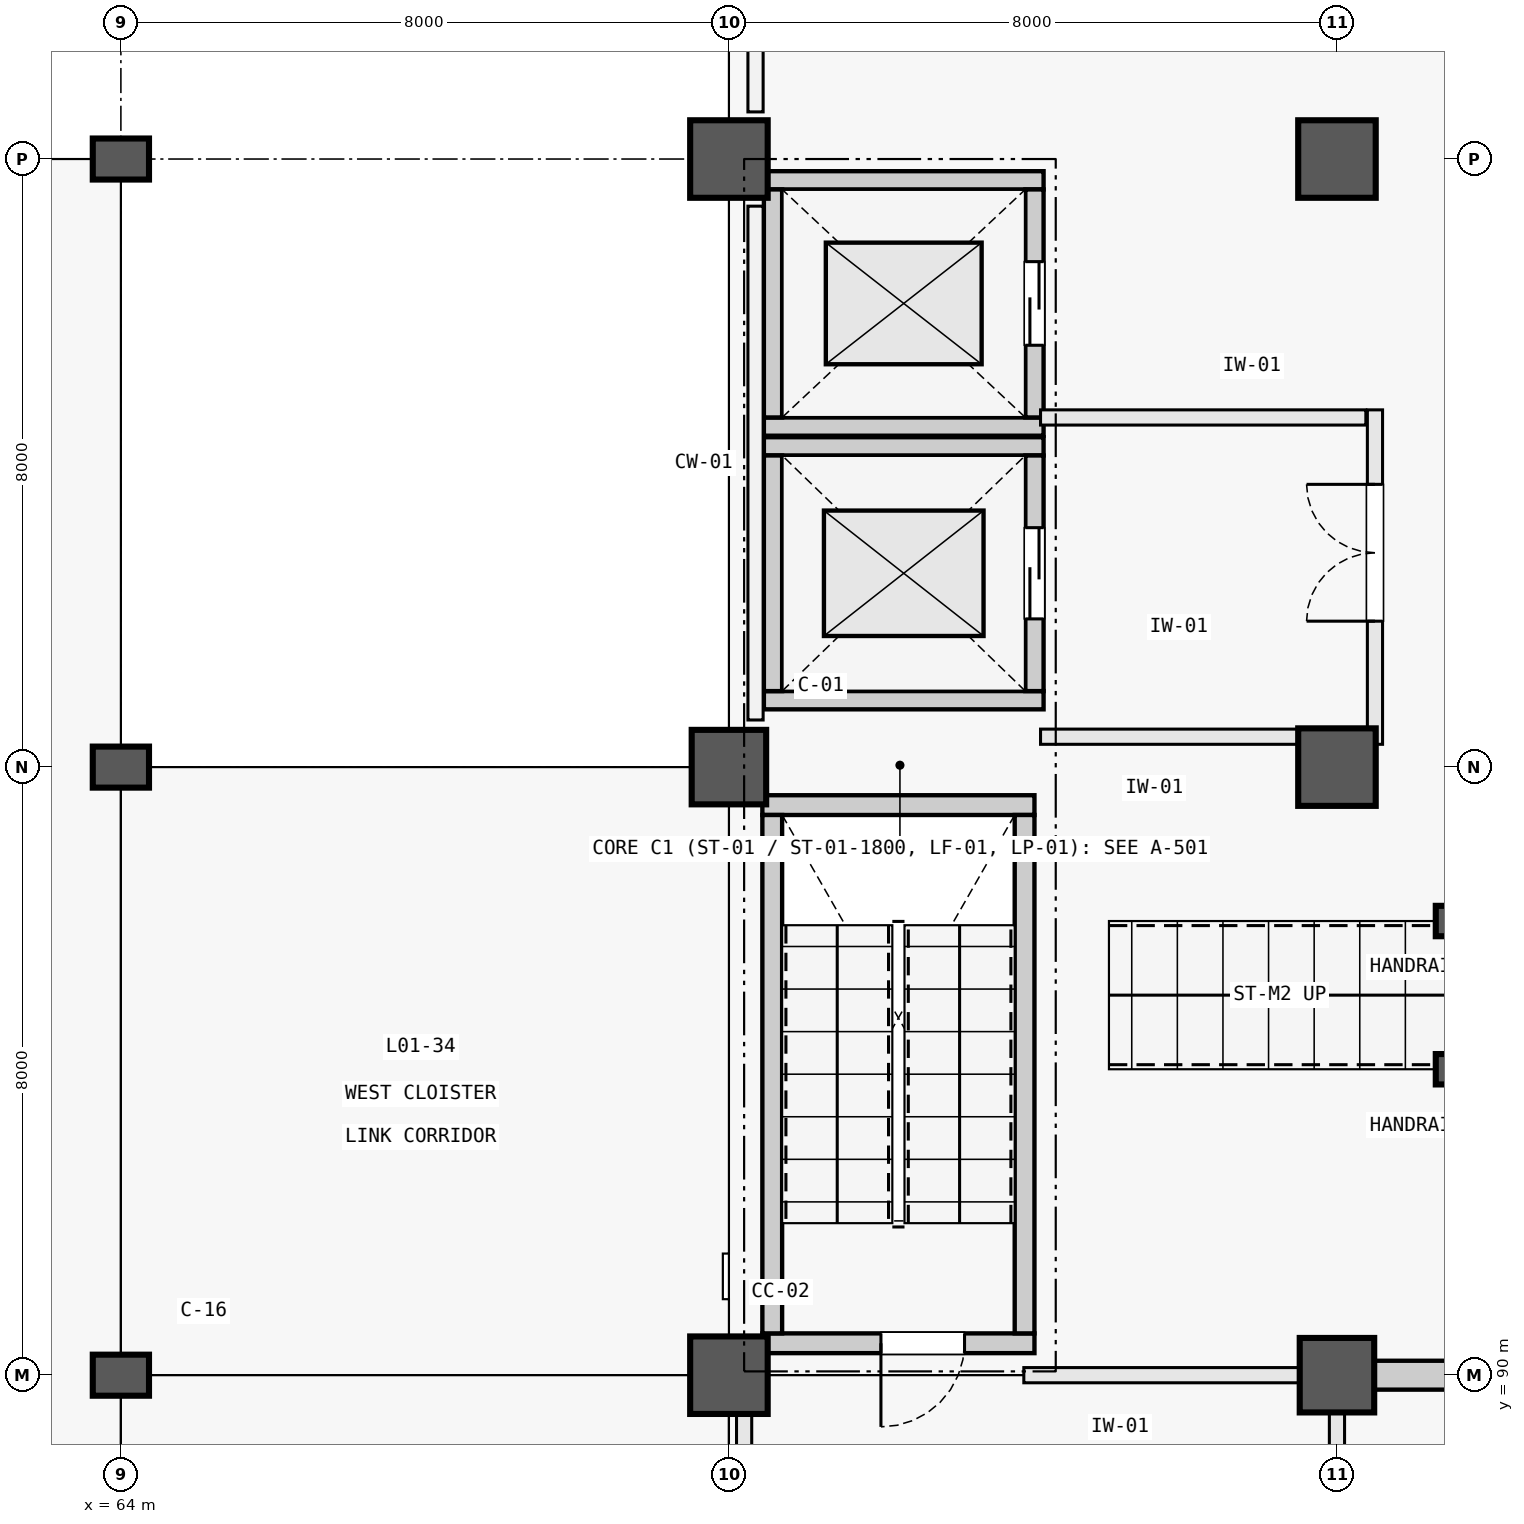
"""IFC4 building model, lengths in metres.
Left out: names, types, materials, properties, quantities, classifications, styles, units other than length and angle.
Written with IfcOpenShell. Run it as: python <this file> out.ifc"""

import sys

from ifc_helpers import new_model, si_unit, direction, frame, frame_2d, origin, origin_2d, place, context, subcontext, project, spatial, rectangle, circle, extrude, element, fill, save


model = new_model("IFC4")
c1 = context("Model", 3, precision=1e-05, world=origin(), true_north=direction((0.0, 1.0)))
c2 = subcontext(c1, "Body", "Model", "MODEL_VIEW")
j1 = project(units=[si_unit("LENGTHUNIT", "METRE"), si_unit("PLANEANGLEUNIT", "RADIAN")], contexts=[c1])
p1 = place(None, origin())
s1 = spatial("IfcSite", under=j1, at=p1, CompositionType="ELEMENT")
p2 = place(p1, origin())
s2 = spatial("IfcBuilding", under=s1, at=p2, CompositionType="ELEMENT")
p3 = place(p2, origin())
s3 = spatial("IfcBuildingStorey", under=s2, at=p3, CompositionType="ELEMENT", Elevation=0.0)
for number, where, z_axis, x_axis in (
    (1, (64.0, 90.0, 0.0), (0.0, 0.0, 1.0), (1.0, 0.0, 0.0)),
    (2, (64.0, 98.0, 0.0), (0.0, 0.0, 1.0), (1.0, 0.0, 0.0)),
    (3, (64.0, 106.0, 0.0), (0.0, 0.0, 1.0), (1.0, 0.0, 0.0)),
):
    element("IfcColumn", number, at=place(p3, frame(where, z_axis=z_axis, x_axis=x_axis)), inside=s3, PredefinedType="COLUMN", context=c2, shape_type="SweptSolid", body=[
        extrude(rectangle(XDim=0.74, YDim=0.54, at=origin_2d()), origin(), (0.0, 0.0, 1.0), 5.4),
    ])
p4 = place(p3, frame((72.0, 90.0, 0.0), z_axis=(0.0, 0.0, 1.0), x_axis=(1.0, 0.0, 0.0)))
e4 = element("IfcColumn", 4, at=p4, inside=s3, PredefinedType="COLUMN", context=c2, shape_type="SweptSolid", body=[
    extrude(circle(Radius=0.51, at=origin_2d()), origin(), (0.0, 0.0, 1.0), 5.4),
])
p5 = place(p3, frame((72.0, 98.0, 0.0), z_axis=(0.0, 0.0, 1.0), x_axis=(1.0, 0.0, 0.0)))
e5 = element("IfcColumn", 5, at=p5, inside=s3, PredefinedType="COLUMN", context=c2, shape_type="SweptSolid", body=[
    extrude(rectangle(XDim=0.98, YDim=0.98, at=origin_2d()), origin(), (0.0, 0.0, 1.0), 5.4),
])
p6 = place(p3, frame((72.0, 106.0, 0.0), z_axis=(0.0, 0.0, 1.0), x_axis=(1.0, 0.0, 0.0)))
e6 = element("IfcColumn", 6, at=p6, inside=s3, PredefinedType="COLUMN", context=c2, shape_type="SweptSolid", body=[
    extrude(circle(Radius=0.51, at=origin_2d()), origin(), (0.0, 0.0, 1.0), 5.4),
])
p7 = place(p3, frame((80.0, 90.0, 0.0), z_axis=(0.0, 0.0, 1.0), x_axis=(1.0, 0.0, 0.0)))
e7 = element("IfcColumn", 7, at=p7, inside=s3, PredefinedType="COLUMN", context=c2, shape_type="SweptSolid", body=[
    extrude(rectangle(XDim=0.98, YDim=0.98, at=origin_2d()), origin(), (0.0, 0.0, 1.0), 5.4),
])
for number, where, z_axis, x_axis in (
    (8, (80.0, 98.0, 0.0), (0.0, 0.0, 1.0), (1.0, 0.0, 0.0)),
    (9, (80.0, 106.0, 0.0), (0.0, 0.0, 1.0), (1.0, 0.0, 0.0)),
):
    element("IfcColumn", number, at=place(p3, frame(where, z_axis=z_axis, x_axis=x_axis)), inside=s3, PredefinedType="COLUMN", context=c2, shape_type="SweptSolid", body=[
        extrude(circle(Radius=0.51, at=origin_2d()), origin(), (0.0, 0.0, 1.0), 5.4),
    ])
p8 = place(p3, frame((80.49, 90.0, 0.0), z_axis=(0.0, 0.0, 1.0), x_axis=(1.0, 0.0, 0.0)))
e10 = element("IfcWall", 10, at=p8, inside=s3, PredefinedType="SHEAR", context=c2, shape_type="SweptSolid", body=[
    extrude(rectangle(XDim=7.0, YDim=0.38, at=frame_2d((3.5, 0.0))), origin(), (0.0, 0.0, 1.0), 5.03),
])
p9 = place(p3, frame((72.44, 90.42, 0.0), z_axis=(0.0, 0.0, 1.0), x_axis=(1.0, 0.0, 0.0)))
e11 = element("IfcWall", 11, at=p9, inside=s3, PredefinedType="SOLIDWALL", context=c2, shape_type="SweptSolid", body=[
    extrude(rectangle(XDim=3.58, YDim=0.26, at=frame_2d((1.79, 0.0))), origin(), (0.0, 0.0, 1.0), 5.4),
])
p10 = place(p9, frame((1.56, 0.0, 0.0)))
e12 = element("IfcOpeningElement", 12, at=p10, cuts=e11, PredefinedType="OPENING", context=c2, shape_type="SweptSolid", body=[
    extrude(rectangle(XDim=1.1, YDim=2.2, at=frame_2d((0.55, 1.1))), frame((0.0, 0.142, 0.0), z_axis=(0.0, -1.0, 0.0), x_axis=(1.0, 0.0, 0.0)), (0.0, 0.0, 1.0), 0.284),
])
p11 = place(p3, frame((72.44, 97.5, 0.0), z_axis=(0.0, 0.0, 1.0), x_axis=(1.0, 0.0, 0.0)))
e13 = element("IfcWall", 13, at=p11, inside=s3, PredefinedType="SOLIDWALL", context=c2, shape_type="SweptSolid", body=[
    extrude(rectangle(XDim=3.58, YDim=0.26, at=frame_2d((1.79, 0.0))), origin(), (0.0, 0.0, 1.0), 5.4),
])
for number, where, z_axis, x_axis in (
    (14, (72.57, 90.55, 0.0), (0.0, 0.0, 1.0), (0.0, 1.0, 0.0)),
    (15, (75.89, 90.55, 0.0), (0.0, 0.0, 1.0), (0.0, 1.0, 0.0)),
):
    element("IfcWall", number, at=place(p3, frame(where, z_axis=z_axis, x_axis=x_axis)), inside=s3, PredefinedType="SOLIDWALL", context=c2, shape_type="SweptSolid", body=[
        extrude(rectangle(XDim=6.82, YDim=0.26, at=frame_2d((3.41, 0.0))), origin(), (0.0, 0.0, 1.0), 5.4),
    ])
for number, where, z_axis, x_axis in (
    (16, (81.5, 94.025, 0.0), (0.0, 0.0, 1.0), (1.0, 0.0, 0.0)),
    (17, (81.5, 95.975, 0.0), (0.0, 0.0, 1.0), (1.0, 0.0, 0.0)),
):
    element("IfcColumn", number, at=place(p3, frame(where, z_axis=z_axis, x_axis=x_axis)), inside=s3, PredefinedType="COLUMN", context=c2, shape_type="SweptSolid", body=[
        extrude(rectangle(XDim=0.4, YDim=0.4, at=origin_2d()), origin(), (0.0, 0.0, 1.0), 2.46),
    ])
for number, where, z_axis, x_axis in (
    (18, (72.46, 98.88, 0.0), (0.0, 0.0, 1.0), (1.0, 0.0, 0.0)),
    (19, (72.46, 102.22, 0.0), (0.0, 0.0, 1.0), (1.0, 0.0, 0.0)),
):
    element("IfcWall", number, at=place(p3, frame(where, z_axis=z_axis, x_axis=x_axis)), inside=s3, PredefinedType="SOLIDWALL", context=c2, shape_type="SweptSolid", body=[
        extrude(rectangle(XDim=3.68, YDim=0.24, at=frame_2d((1.84, 0.0))), origin(), (0.0, 0.0, 1.0), 5.4),
    ])
p12 = place(p3, frame((72.58, 99.0, 0.0), z_axis=(0.0, 0.0, 1.0), x_axis=(0.0, 1.0, 0.0)))
e20 = element("IfcWall", 20, at=p12, inside=s3, PredefinedType="SOLIDWALL", context=c2, shape_type="SweptSolid", body=[
    extrude(rectangle(XDim=3.1, YDim=0.24, at=frame_2d((1.55, 0.0))), origin(), (0.0, 0.0, 1.0), 5.4),
])
p13 = place(p3, frame((76.02, 99.0, 0.0), z_axis=(0.0, 0.0, 1.0), x_axis=(0.0, 1.0, 0.0)))
e21 = element("IfcWall", 21, at=p13, inside=s3, PredefinedType="SOLIDWALL", context=c2, shape_type="SweptSolid", body=[
    extrude(rectangle(XDim=3.1, YDim=0.24, at=frame_2d((1.55, 0.0))), origin(), (0.0, 0.0, 1.0), 5.4),
])
p14 = place(p13, frame((0.95, 0.0, 0.0)))
e22 = element("IfcOpeningElement", 22, at=p14, cuts=e21, PredefinedType="OPENING", context=c2, shape_type="SweptSolid", body=[
    extrude(rectangle(XDim=1.2, YDim=2.2, at=frame_2d((0.6, 1.1))), frame((0.0, 0.132, 0.0), z_axis=(0.0, -1.0, 0.0), x_axis=(1.0, 0.0, 0.0)), (0.0, 0.0, 1.0), 0.264),
])
for number, where, z_axis, x_axis in (
    (23, (72.46, 102.48, 0.0), (0.0, 0.0, 1.0), (1.0, 0.0, 0.0)),
    (24, (72.46, 105.72, 0.0), (0.0, 0.0, 1.0), (1.0, 0.0, 0.0)),
):
    element("IfcWall", number, at=place(p3, frame(where, z_axis=z_axis, x_axis=x_axis)), inside=s3, PredefinedType="SOLIDWALL", context=c2, shape_type="SweptSolid", body=[
        extrude(rectangle(XDim=3.68, YDim=0.24, at=frame_2d((1.84, 0.0))), origin(), (0.0, 0.0, 1.0), 5.4),
    ])
p15 = place(p3, frame((72.58, 102.6, 0.0), z_axis=(0.0, 0.0, 1.0), x_axis=(0.0, 1.0, 0.0)))
e25 = element("IfcWall", 25, at=p15, inside=s3, PredefinedType="SOLIDWALL", context=c2, shape_type="SweptSolid", body=[
    extrude(rectangle(XDim=3.0, YDim=0.24, at=frame_2d((1.5, 0.0))), origin(), (0.0, 0.0, 1.0), 5.4),
])
p16 = place(p3, frame((76.02, 102.6, 0.0), z_axis=(0.0, 0.0, 1.0), x_axis=(0.0, 1.0, 0.0)))
e26 = element("IfcWall", 26, at=p16, inside=s3, PredefinedType="SOLIDWALL", context=c2, shape_type="SweptSolid", body=[
    extrude(rectangle(XDim=3.0, YDim=0.24, at=frame_2d((1.5, 0.0))), origin(), (0.0, 0.0, 1.0), 5.4),
])
p17 = place(p16, frame((0.95, 0.0, 0.0)))
e27 = element("IfcOpeningElement", 27, at=p17, cuts=e26, PredefinedType="OPENING", context=c2, shape_type="SweptSolid", body=[
    extrude(rectangle(XDim=1.1, YDim=2.2, at=frame_2d((0.55, 1.1))), frame((0.0, 0.132, 0.0), z_axis=(0.0, -1.0, 0.0), x_axis=(1.0, 0.0, 0.0)), (0.0, 0.0, 1.0), 0.264),
])
for number, where, z_axis, x_axis in (
    (28, (76.1, 98.4, 0.0), (0.0, 0.0, 1.0), (1.0, 0.0, 0.0)),
    (29, (76.1, 102.6, 0.0), (0.0, 0.0, 1.0), (1.0, 0.0, 0.0)),
):
    element("IfcWall", number, at=place(p3, frame(where, z_axis=z_axis, x_axis=x_axis)), inside=s3, PredefinedType="PARTITIONING", context=c2, shape_type="SweptSolid", body=[
        extrude(rectangle(XDim=4.28, YDim=0.2, at=frame_2d((2.14, 0.0))), origin(), (0.0, 0.0, 1.0), 4.05),
    ])
p18 = place(p3, frame((80.5, 98.3, 0.0), z_axis=(0.0, 0.0, 1.0), x_axis=(0.0, 1.0, 0.0)))
e30 = element("IfcWall", 30, at=p18, inside=s3, PredefinedType="PARTITIONING", context=c2, shape_type="SweptSolid", body=[
    extrude(rectangle(XDim=4.4, YDim=0.2, at=frame_2d((2.2, 0.0))), origin(), (0.0, 0.0, 1.0), 4.05),
])
p19 = place(p18, frame((1.62, 0.0, 0.0)))
e31 = element("IfcOpeningElement", 31, at=p19, cuts=e30, PredefinedType="OPENING", context=c2, shape_type="SweptSolid", body=[
    extrude(rectangle(XDim=1.8, YDim=2.25, at=frame_2d((0.9, 1.125))), frame((0.0, 0.112, 0.0), z_axis=(0.0, -1.0, 0.0), x_axis=(1.0, 0.0, 0.0)), (0.0, 0.0, 1.0), 0.224),
])
p20 = place(p3, frame((72.2, 84.6, 0.0), z_axis=(0.0, 0.0, 1.0), x_axis=(0.0, 1.0, 0.0)))
e32 = element("IfcWall", 32, at=p20, inside=s3, PredefinedType="PARTITIONING", context=c2, shape_type="SweptSolid", body=[
    extrude(rectangle(XDim=5.28, YDim=0.2, at=frame_2d((2.64, 0.0))), origin(), (0.0, 0.0, 1.0), 3.88),
])
p21 = place(p20, frame((2.04, 0.0, 0.0)))
e33 = element("IfcOpeningElement", 33, at=p21, cuts=e32, PredefinedType="OPENING", context=c2, shape_type="SweptSolid", body=[
    extrude(rectangle(XDim=1.2, YDim=2.25, at=frame_2d((0.6, 1.125))), frame((0.0, 0.112, 0.0), z_axis=(0.0, -1.0, 0.0), x_axis=(1.0, 0.0, 0.0)), (0.0, 0.0, 1.0), 0.224),
])
p22 = place(p3, frame((80.0, 84.72, 0.0), z_axis=(0.0, 0.0, 1.0), x_axis=(0.0, 1.0, 0.0)))
e34 = element("IfcWall", 34, at=p22, inside=s3, PredefinedType="PARTITIONING", context=c2, shape_type="SweptSolid", body=[
    extrude(rectangle(XDim=4.78, YDim=0.2, at=frame_2d((2.39, 0.0))), origin(), (0.0, 0.0, 1.0), 3.88),
])
p23 = place(p22, frame((1.79, 0.0, 0.0)))
e35 = element("IfcOpeningElement", 35, at=p23, cuts=e34, PredefinedType="OPENING", context=c2, shape_type="SweptSolid", body=[
    extrude(rectangle(XDim=1.2, YDim=2.25, at=frame_2d((0.6, 1.125))), frame((0.0, 0.112, 0.0), z_axis=(0.0, -1.0, 0.0), x_axis=(1.0, 0.0, 0.0)), (0.0, 0.0, 1.0), 0.224),
])
p24 = place(p3, frame((75.88, 90.0, 0.0), z_axis=(0.0, 0.0, 1.0), x_axis=(1.0, 0.0, 0.0)))
e36 = element("IfcWall", 36, at=p24, inside=s3, PredefinedType="PARTITIONING", context=c2, shape_type="SweptSolid", body=[
    extrude(rectangle(XDim=3.62, YDim=0.2, at=frame_2d((1.81, 0.0))), origin(), (0.0, 0.0, 1.0), 3.88),
])
p25 = place(p10, frame((1.1, 0.0, 0.0), z_axis=(0.0, 0.0, 1.0), x_axis=(-1.0, 0.0, 0.0)))
e37 = element("IfcDoor", 37, at=p25, inside=s3, OperationType="SINGLE_SWING_LEFT", PredefinedType="DOOR", context=c2, shape_type="SweptSolid", body=[
    extrude(rectangle(XDim=1.1, YDim=2.2, at=frame_2d((0.55, 1.1))), frame((0.0, 0.025, 0.0), z_axis=(0.0, -1.0, 0.0), x_axis=(1.0, 0.0, 0.0)), (0.0, 0.0, 1.0), 0.05),
])
fill(e12, e37)
p26 = place(p14, origin())
e38 = element("IfcDoor", 38, at=p26, inside=s3, OperationType="DOUBLE_DOOR_SLIDING", PredefinedType="DOOR", context=c2, shape_type="SweptSolid", body=[
    extrude(rectangle(XDim=1.2, YDim=2.2, at=frame_2d((0.6, 1.1))), frame((0.0, 0.025, 0.0), z_axis=(0.0, -1.0, 0.0), x_axis=(1.0, 0.0, 0.0)), (0.0, 0.0, 1.0), 0.05),
])
fill(e22, e38)
p27 = place(p17, origin())
e39 = element("IfcDoor", 39, at=p27, inside=s3, OperationType="DOUBLE_DOOR_SLIDING", PredefinedType="DOOR", context=c2, shape_type="SweptSolid", body=[
    extrude(rectangle(XDim=1.1, YDim=2.2, at=frame_2d((0.55, 1.1))), frame((0.0, 0.025, 0.0), z_axis=(0.0, -1.0, 0.0), x_axis=(1.0, 0.0, 0.0)), (0.0, 0.0, 1.0), 0.05),
])
fill(e27, e39)
p28 = place(p19, origin())
e40 = element("IfcDoor", 40, at=p28, inside=s3, OperationType="DOUBLE_DOOR_SINGLE_SWING", PredefinedType="DOOR", context=c2, shape_type="SweptSolid", body=[
    extrude(rectangle(XDim=1.8, YDim=2.25, at=frame_2d((0.9, 1.125))), frame((0.0, 0.025, 0.0), z_axis=(0.0, -1.0, 0.0), x_axis=(1.0, 0.0, 0.0)), (0.0, 0.0, 1.0), 0.05),
])
fill(e31, e40)
save(model, sys.argv[1])
